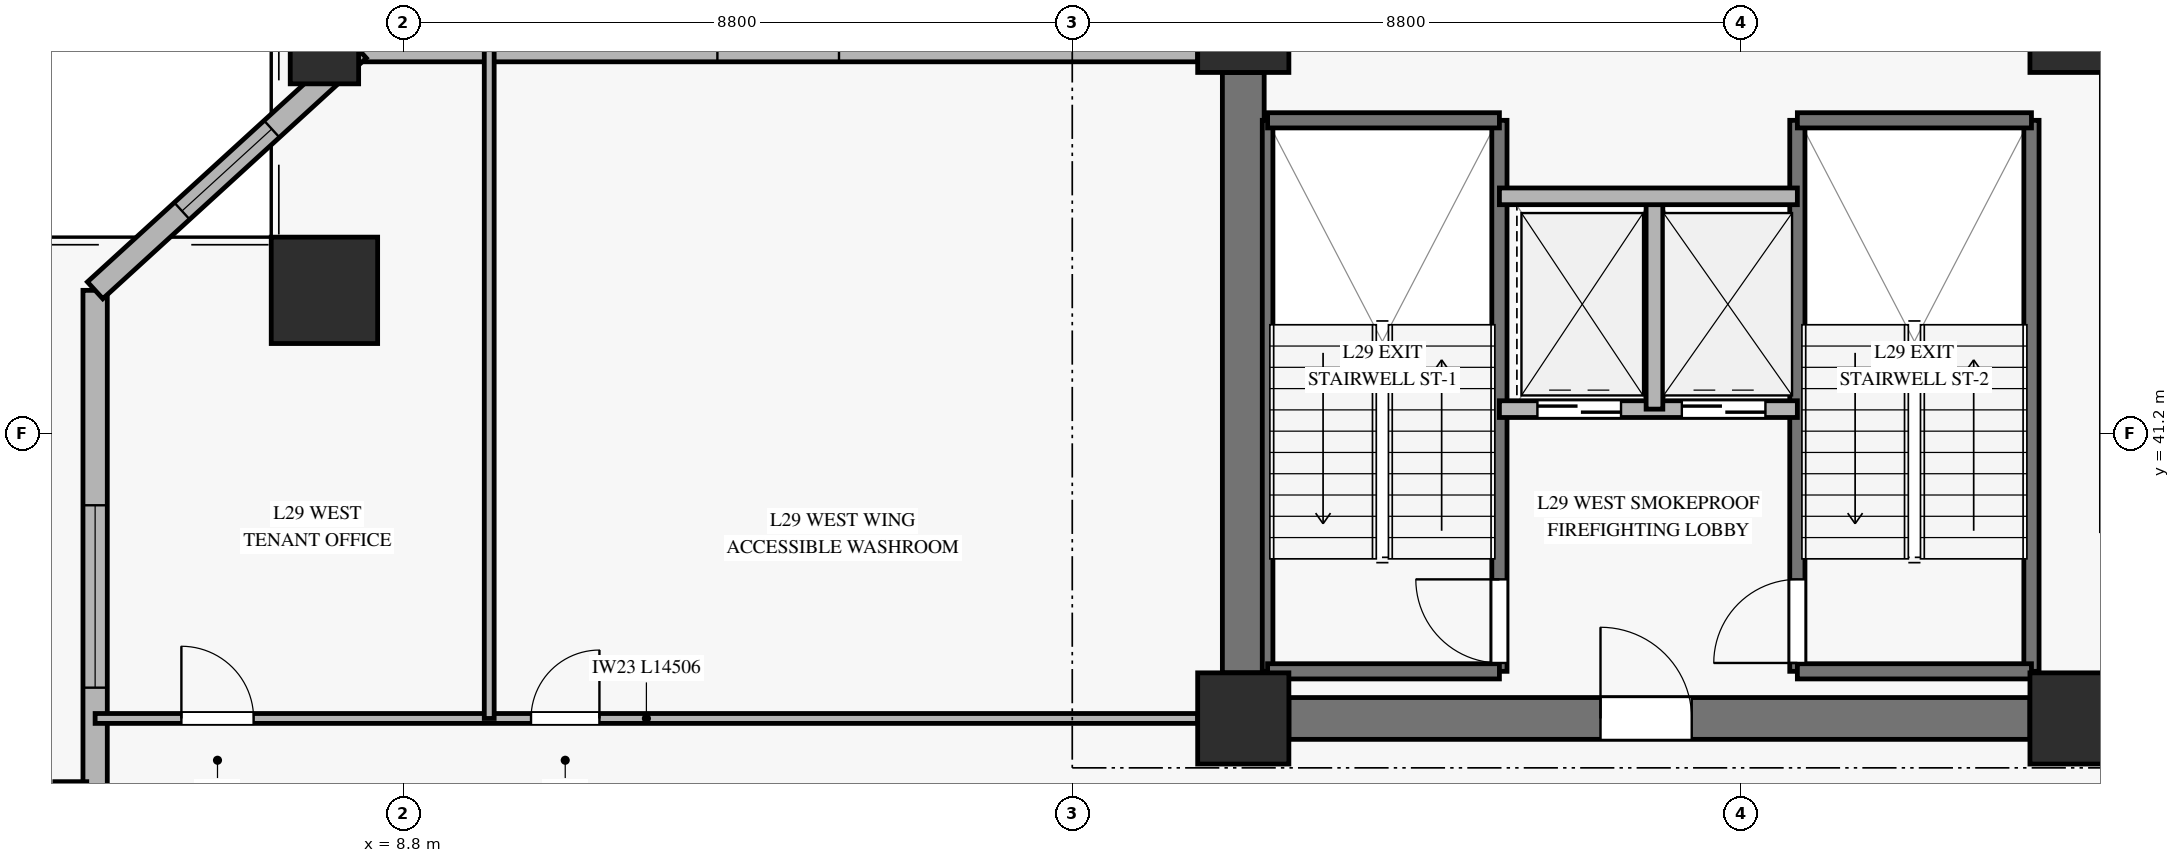
"""IFC4 building model, lengths in metres.
Left out: names, types, materials, properties, quantities, classifications, styles, units other than length and angle.
Written with IfcOpenShell. Run it as: python <this file> out.ifc"""

import sys

from ifc_helpers import new_model, si_unit, direction, frame, frame_2d, origin, origin_2d, place, context, subcontext, project, spatial, rectangle, hollow_rectangle, extrude, source, transform, mapped, element, fill, save


model = new_model("IFC4")
c1 = context("Model", 3, precision=1e-05, world=origin(), true_north=direction((0.0, 1.0)))
c2 = subcontext(c1, "Body", "Model", "MODEL_VIEW")
j1 = project(units=[si_unit("LENGTHUNIT", "METRE"), si_unit("PLANEANGLEUNIT", "RADIAN")], contexts=[c1])
p1 = place(None, origin())
s1 = spatial("IfcSite", under=j1, at=p1, CompositionType="ELEMENT")
p2 = place(p1, origin())
s2 = spatial("IfcBuilding", under=s1, at=p2, CompositionType="ELEMENT")
p3 = place(p2, frame((0.0, 0.0, 119.2)))
s3 = spatial("IfcBuildingStorey", under=s2, at=p3, CompositionType="ELEMENT", Elevation=119.2)
m1 = source(origin(), c2, "Body", "SweptSolid", [
    extrude(rectangle(XDim=1.2, YDim=1.2, at=origin_2d()), origin(), (0.0, 0.0, 1.0), 3.68),
])
for number, where, z_axis, x_axis in (
    (1, (19.85, 37.45, 0.0), (0.0, 0.0, 1.0), (1.0, 0.0, 0.0)),
    (2, (19.85, 46.55, 0.0), (0.0, 0.0, 1.0), (1.0, 0.0, 0.0)),
    (3, (30.8, 37.45, 0.0), (0.0, 0.0, 1.0), (1.0, 0.0, 0.0)),
    (4, (30.8, 46.55, 0.0), (0.0, 0.0, 1.0), (1.0, 0.0, 0.0)),
):
    element("IfcColumn", number, at=place(p3, frame(where, z_axis=z_axis, x_axis=x_axis)), inside=s3, PredefinedType="PILASTER", context=c2, shape_type="MappedRepresentation", body=[
        mapped(m1, transform((0.0, 0.0, 0.0), x_axis=(1.0, 0.0, 0.0), y_axis=(0.0, 1.0, 0.0), z_axis=(0.0, 0.0, 1.0), scale=1.0)),
    ])
p4 = place(p3, frame((20.45, 37.45, 0.0), z_axis=(0.0, 0.0, 1.0), x_axis=(1.0, 0.0, 0.0)))
e5 = element("IfcWall", 5, at=p4, inside=s3, PredefinedType="SHEAR", context=c2, shape_type="SweptSolid", body=[
    extrude(rectangle(XDim=9.75, YDim=0.55, at=frame_2d((4.875, 0.0))), origin(), (0.0, 0.0, 1.0), 3.68),
])
p5 = place(p4, frame((4.1, 0.0, 0.0)))
e6 = element("IfcOpeningElement", 6, at=p5, cuts=e5, PredefinedType="OPENING", context=c2, shape_type="SweptSolid", body=[
    extrude(rectangle(XDim=1.2, YDim=2.15, at=frame_2d((0.6, 1.075))), frame((0.0, 0.285, 0.0), z_axis=(0.0, -1.0, 0.0), x_axis=(1.0, 0.0, 0.0)), (0.0, 0.0, 1.0), 0.57),
])
p6 = place(p3, frame((19.85, 38.05, 0.0), z_axis=(0.0, 0.0, 1.0), x_axis=(0.0, 1.0, 0.0)))
e7 = element("IfcWall", 7, at=p6, inside=s3, PredefinedType="SHEAR", context=c2, shape_type="SweptSolid", body=[
    extrude(rectangle(XDim=7.9, YDim=0.55, at=frame_2d((3.95, 0.0))), origin(), (0.0, 0.0, 1.0), 3.68),
])
m2 = source(origin(), c2, "Body", "SweptSolid", [
    extrude(hollow_rectangle(XDim=1.4, YDim=1.4, WallThickness=0.065, at=origin_2d()), origin(), (0.0, 0.0, 1.0), 3.686),
])
p7 = place(p3, frame((7.761, 43.083, 0.0), z_axis=(0.056697532498, 0.007020956127, 0.998366714181), x_axis=(-0.122893119903, 0.992419911671, 0.0)))
e8 = element("IfcColumn", 8, at=p7, inside=s3, PredefinedType="COLUMN", context=c2, shape_type="MappedRepresentation", body=[
    mapped(m2, transform((0.0, 0.0, 0.0), x_axis=(1.0, 0.0, 0.0), y_axis=(0.0, 1.0, 0.0), z_axis=(0.0, 0.0, 1.0), scale=1.0)),
])
m3 = source(origin(), c2, "Body", "SweptSolid", [
    extrude(hollow_rectangle(XDim=0.9, YDim=0.9, WallThickness=0.04, at=origin_2d()), origin(), (0.0, 0.0, 1.0), 3.686),
])
p8 = place(p3, frame((7.761, 46.25, 0.0), z_axis=(0.056698929969, 0.0, 0.998391321747), x_axis=(0.0, 1.0, 0.0)))
e9 = element("IfcColumn", 9, at=p8, inside=s3, PredefinedType="COLUMN", context=c2, shape_type="MappedRepresentation", body=[
    mapped(m3, transform((0.0, 0.0, 0.0), x_axis=(1.0, 0.0, 0.0), y_axis=(0.0, 1.0, 0.0), z_axis=(0.0, 0.0, 1.0), scale=1.0)),
])
p9 = place(p3, frame((4.744, 26.995, 0.0), z_axis=(0.0, 0.0, 1.0), x_axis=(0.0, 1.0, 0.0)))
e10 = element("IfcWall", 10, at=p9, inside=s3, PredefinedType="SOLIDWALL", context=c2, shape_type="SweptSolid", body=[
    extrude(rectangle(XDim=16.088, YDim=0.32, at=frame_2d((8.044, 0.0))), origin(), (0.0, 0.0, 1.0), 3.16),
])
p10 = place(p9, frame((10.86, 0.0, 0.45)))
e11 = element("IfcOpeningElement", 11, at=p10, cuts=e10, PredefinedType="OPENING", context=c2, shape_type="SweptSolid", body=[
    extrude(rectangle(XDim=2.4, YDim=2.1, at=frame_2d((1.2, 1.05))), frame((0.0, 0.17, 0.0), z_axis=(0.0, -1.0, 0.0), x_axis=(1.0, 0.0, 0.0)), (0.0, 0.0, 1.0), 0.34),
])
p11 = place(p3, frame((8.211, 46.25, 0.0), z_axis=(0.0, 0.0, 1.0), x_axis=(1.0, 0.0, 0.0)))
e12 = element("IfcWall", 12, at=p11, inside=s3, PredefinedType="SOLIDWALL", context=c2, shape_type="SweptSolid", body=[
    extrude(rectangle(XDim=11.039, YDim=0.32, at=frame_2d((5.52, 0.0))), origin(), (0.0, 0.0, 1.0), 3.16),
])
p12 = place(p11, frame((4.72, 0.0, 0.45)))
e13 = element("IfcOpeningElement", 13, at=p12, cuts=e12, PredefinedType="OPENING", context=c2, shape_type="SweptSolid", body=[
    extrude(rectangle(XDim=1.6, YDim=2.0, at=frame_2d((0.8, 1.0))), frame((0.0, 0.17, 0.0), z_axis=(0.0, -1.0, 0.0), x_axis=(1.0, 0.0, 0.0)), (0.0, 0.0, 1.0), 0.34),
])
p13 = place(p3, frame((8.211, 46.25, 0.0), z_axis=(0.0, 0.0, 1.0), x_axis=(-0.738333520178, -0.674435773801, 0.0)))
e14 = element("IfcWall", 14, at=p13, inside=s3, PredefinedType="SOLIDWALL", context=c2, shape_type="SweptSolid", body=[
    extrude(rectangle(XDim=4.696, YDim=0.3, at=frame_2d((2.348, 0.0))), origin(), (0.0, 0.0, 1.0), 3.16),
])
p14 = place(p13, frame((1.548, 0.0, 0.45)))
e15 = element("IfcOpeningElement", 15, at=p14, cuts=e14, PredefinedType="OPENING", context=c2, shape_type="SweptSolid", body=[
    extrude(rectangle(XDim=1.6, YDim=2.0, at=frame_2d((0.8, 1.0))), frame((0.0, 0.16, 0.0), z_axis=(0.0, -1.0, 0.0), x_axis=(1.0, 0.0, 0.0)), (0.0, 0.0, 1.0), 0.32),
])
p15 = place(p3, frame((20.17, 38.07, 0.0), z_axis=(0.0, 0.0, 1.0), x_axis=(0.0, 1.0, 0.0)))
e16 = element("IfcWall", 16, at=p15, inside=s3, PredefinedType="SOLIDWALL", context=c2, shape_type="SweptSolid", body=[
    extrude(rectangle(XDim=7.25, YDim=0.14, at=frame_2d((3.625, 0.0))), origin(), (0.0, 0.0, 1.0), 3.9),
])
p16 = place(p3, frame((23.22, 38.07, 0.0), z_axis=(0.0, 0.0, 1.0), x_axis=(0.0, 1.0, 0.0)))
e17 = element("IfcWall", 17, at=p16, inside=s3, PredefinedType="SOLIDWALL", context=c2, shape_type="SweptSolid", body=[
    extrude(rectangle(XDim=7.25, YDim=0.2, at=frame_2d((3.625, 0.0))), origin(), (0.0, 0.0, 1.0), 3.9),
])
p17 = place(p16, frame((0.11, 0.0, 0.0)))
e18 = element("IfcOpeningElement", 18, at=p17, cuts=e17, PredefinedType="OPENING", context=c2, shape_type="SweptSolid", body=[
    extrude(rectangle(XDim=1.1, YDim=2.15, at=frame_2d((0.55, 1.075))), frame((0.0, 0.11, 0.0), z_axis=(0.0, -1.0, 0.0), x_axis=(1.0, 0.0, 0.0)), (0.0, 0.0, 1.0), 0.22),
])
for number, where, z_axis, x_axis in (
    (19, (20.17, 45.32, 0.0), (0.0, 0.0, 1.0), (1.0, 0.0, 0.0)),
    (20, (20.17, 38.07, 0.0), (0.0, 0.0, 1.0), (1.0, 0.0, 0.0)),
):
    element("IfcWall", number, at=place(p3, frame(where, z_axis=z_axis, x_axis=x_axis)), inside=s3, PredefinedType="SOLIDWALL", context=c2, shape_type="SweptSolid", body=[
        extrude(rectangle(XDim=3.05, YDim=0.2, at=frame_2d((1.525, 0.0))), origin(), (0.0, 0.0, 1.0), 3.9),
    ])
p18 = place(p3, frame((27.14, 38.07, 0.0), z_axis=(0.0, 0.0, 1.0), x_axis=(0.0, 1.0, 0.0)))
e21 = element("IfcWall", 21, at=p18, inside=s3, PredefinedType="SOLIDWALL", context=c2, shape_type="SweptSolid", body=[
    extrude(rectangle(XDim=7.25, YDim=0.2, at=frame_2d((3.625, 0.0))), origin(), (0.0, 0.0, 1.0), 3.9),
])
p19 = place(p18, frame((0.11, 0.0, 0.0)))
e22 = element("IfcOpeningElement", 22, at=p19, cuts=e21, PredefinedType="OPENING", context=c2, shape_type="SweptSolid", body=[
    extrude(rectangle(XDim=1.1, YDim=2.15, at=frame_2d((0.55, 1.075))), frame((0.0, 0.11, 0.0), z_axis=(0.0, -1.0, 0.0), x_axis=(1.0, 0.0, 0.0)), (0.0, 0.0, 1.0), 0.22),
])
p20 = place(p3, frame((30.22, 38.07, 0.0), z_axis=(0.0, 0.0, 1.0), x_axis=(0.0, 1.0, 0.0)))
e23 = element("IfcWall", 23, at=p20, inside=s3, PredefinedType="SOLIDWALL", context=c2, shape_type="SweptSolid", body=[
    extrude(rectangle(XDim=7.25, YDim=0.2, at=frame_2d((3.625, 0.0))), origin(), (0.0, 0.0, 1.0), 3.9),
])
for number, where, z_axis, x_axis in (
    (24, (27.14, 45.32, 0.0), (0.0, 0.0, 1.0), (1.0, 0.0, 0.0)),
    (25, (27.14, 38.07, 0.0), (0.0, 0.0, 1.0), (1.0, 0.0, 0.0)),
):
    element("IfcWall", number, at=place(p3, frame(where, z_axis=z_axis, x_axis=x_axis)), inside=s3, PredefinedType="SOLIDWALL", context=c2, shape_type="SweptSolid", body=[
        extrude(rectangle(XDim=3.08, YDim=0.2, at=frame_2d((1.54, 0.0))), origin(), (0.0, 0.0, 1.0), 3.9),
    ])
p21 = place(p3, frame((23.22, 41.52, 0.0), z_axis=(0.0, 0.0, 1.0), x_axis=(1.0, 0.0, 0.0)))
e26 = element("IfcWall", 26, at=p21, inside=s3, PredefinedType="SOLIDWALL", context=c2, shape_type="SweptSolid", body=[
    extrude(rectangle(XDim=3.92, YDim=0.22, at=frame_2d((1.96, 0.0))), origin(), (0.0, 0.0, 1.0), 3.68),
])
p22 = place(p21, frame((0.5, 0.0, 0.0)))
e27 = element("IfcOpeningElement", 27, at=p22, cuts=e26, PredefinedType="OPENING", context=c2, shape_type="SweptSolid", body=[
    extrude(rectangle(XDim=1.1, YDim=2.2, at=frame_2d((0.55, 1.1))), frame((0.0, 0.12, 0.0), z_axis=(0.0, -1.0, 0.0), x_axis=(1.0, 0.0, 0.0)), (0.0, 0.0, 1.0), 0.24),
])
p23 = place(p21, frame((2.4, 0.0, 0.0)))
e28 = element("IfcOpeningElement", 28, at=p23, cuts=e26, PredefinedType="OPENING", context=c2, shape_type="SweptSolid", body=[
    extrude(rectangle(XDim=1.1, YDim=2.2, at=frame_2d((0.55, 1.1))), frame((0.0, 0.12, 0.0), z_axis=(0.0, -1.0, 0.0), x_axis=(1.0, 0.0, 0.0)), (0.0, 0.0, 1.0), 0.24),
])
p24 = place(p3, frame((25.26, 41.52, 0.0), z_axis=(0.0, 0.0, 1.0), x_axis=(0.0, 1.0, 0.0)))
e29 = element("IfcWall", 29, at=p24, inside=s3, PredefinedType="SOLIDWALL", context=c2, shape_type="SweptSolid", body=[
    extrude(rectangle(XDim=2.8, YDim=0.22, at=frame_2d((1.4, 0.0))), origin(), (0.0, 0.0, 1.0), 3.68),
])
p25 = place(p3, frame((23.22, 44.32, 0.0), z_axis=(0.0, 0.0, 1.0), x_axis=(1.0, 0.0, 0.0)))
e30 = element("IfcWall", 30, at=p25, inside=s3, PredefinedType="SOLIDWALL", context=c2, shape_type="SweptSolid", body=[
    extrude(rectangle(XDim=3.92, YDim=0.22, at=frame_2d((1.96, 0.0))), origin(), (0.0, 0.0, 1.0), 3.68),
])
p26 = place(p3, frame((4.744, 37.45, 0.0), z_axis=(0.0, 0.0, 1.0), x_axis=(1.0, 0.0, 0.0)))
e31 = element("IfcWall", 31, at=p26, inside=s3, PredefinedType="PARTITIONING", context=c2, shape_type="SweptSolid", body=[
    extrude(rectangle(XDim=14.506, YDim=0.13, at=frame_2d((7.253, 0.0))), origin(), (0.0, 0.0, 1.0), 3.165),
])
p27 = place(p26, frame((1.135, 0.0, 0.0)))
e32 = element("IfcOpeningElement", 32, at=p27, cuts=e31, PredefinedType="OPENING", context=c2, shape_type="SweptSolid", body=[
    extrude(rectangle(XDim=0.95, YDim=2.1, at=frame_2d((0.475, 1.05))), frame((0.0, 0.075, 0.0), z_axis=(0.0, -1.0, 0.0), x_axis=(1.0, 0.0, 0.0)), (0.0, 0.0, 1.0), 0.15),
])
p28 = place(p26, frame((5.735, 0.0, 0.0)))
e33 = element("IfcOpeningElement", 33, at=p28, cuts=e31, PredefinedType="OPENING", context=c2, shape_type="SweptSolid", body=[
    extrude(rectangle(XDim=0.9, YDim=2.1, at=frame_2d((0.45, 1.05))), frame((0.0, 0.075, 0.0), z_axis=(0.0, -1.0, 0.0), x_axis=(1.0, 0.0, 0.0)), (0.0, 0.0, 1.0), 0.15),
])
p29 = place(p3, frame((9.929, 37.45, 0.0), z_axis=(0.0, 0.0, 1.0), x_axis=(0.0, 1.0, 0.0)))
e34 = element("IfcWall", 34, at=p29, inside=s3, PredefinedType="PARTITIONING", context=c2, shape_type="SweptSolid", body=[
    extrude(rectangle(XDim=8.8, YDim=0.13, at=frame_2d((4.4, 0.0))), origin(), (0.0, 0.0, 1.0), 3.68),
])
m4 = source(origin(), c2, "Body", "SweptSolid", [
    extrude(rectangle(XDim=2.4, YDim=2.1, at=frame_2d((1.2, 1.05))), frame((0.0, 0.03, 0.0), z_axis=(0.0, -1.0, 0.0), x_axis=(1.0, 0.0, 0.0)), (0.0, 0.0, 1.0), 0.06),
])
p30 = place(p10, origin())
e35 = element("IfcWindow", 35, at=p30, inside=s3, PartitioningType="SINGLE_PANEL", PredefinedType="WINDOW", context=c2, shape_type="MappedRepresentation", body=[
    mapped(m4, transform((0.0, 0.0, 0.0), x_axis=(1.0, 0.0, 0.0), y_axis=(0.0, 1.0, 0.0), z_axis=(0.0, 0.0, 1.0), scale=1.0)),
])
fill(e11, e35)
m5 = source(origin(), c2, "Body", "SweptSolid", [
    extrude(rectangle(XDim=1.6, YDim=2.0, at=frame_2d((0.8, 1.0))), frame((0.0, 0.03, 0.0), z_axis=(0.0, -1.0, 0.0), x_axis=(1.0, 0.0, 0.0)), (0.0, 0.0, 1.0), 0.06),
])
p31 = place(p14, origin())
e36 = element("IfcWindow", 36, at=p31, inside=s3, PartitioningType="SINGLE_PANEL", PredefinedType="WINDOW", context=c2, shape_type="MappedRepresentation", body=[
    mapped(m5, transform((0.0, 0.0, 0.0), x_axis=(1.0, 0.0, 0.0), y_axis=(0.0, 1.0, 0.0), z_axis=(0.0, 0.0, 1.0), scale=1.0)),
])
fill(e15, e36)
m6 = source(origin(), c2, "Body", "SweptSolid", [
    extrude(rectangle(XDim=1.1, YDim=2.15, at=frame_2d((0.55, 1.075))), frame((0.0, 0.025, 0.0), z_axis=(0.0, -1.0, 0.0), x_axis=(1.0, 0.0, 0.0)), (0.0, 0.0, 1.0), 0.05),
])
p32 = place(p17, origin())
e37 = element("IfcDoor", 37, at=p32, inside=s3, OperationType="SINGLE_SWING_RIGHT", PredefinedType="DOOR", context=c2, shape_type="MappedRepresentation", body=[
    mapped(m6, transform((0.0, 0.0, 0.0), x_axis=(1.0, 0.0, 0.0), y_axis=(0.0, 1.0, 0.0), z_axis=(0.0, 0.0, 1.0), scale=1.0)),
])
fill(e18, e37)
p33 = place(p19, origin())
e38 = element("IfcDoor", 38, at=p33, inside=s3, OperationType="SINGLE_SWING_LEFT", PredefinedType="DOOR", context=c2, shape_type="MappedRepresentation", body=[
    mapped(m6, transform((0.0, 0.0, 0.0), x_axis=(1.0, 0.0, 0.0), y_axis=(0.0, 1.0, 0.0), z_axis=(0.0, 0.0, 1.0), scale=1.0)),
])
fill(e22, e38)
m7 = source(origin(), c2, "Body", "SweptSolid", [
    extrude(rectangle(XDim=1.1, YDim=2.2, at=frame_2d((0.55, 1.1))), frame((0.0, 0.025, 0.0), z_axis=(0.0, -1.0, 0.0), x_axis=(1.0, 0.0, 0.0)), (0.0, 0.0, 1.0), 0.05),
])
p34 = place(p22, origin())
e39 = element("IfcDoor", 39, at=p34, inside=s3, OperationType="SLIDING_TO_LEFT", PredefinedType="DOOR", context=c2, shape_type="MappedRepresentation", body=[
    mapped(m7, transform((0.0, 0.0, 0.0), x_axis=(1.0, 0.0, 0.0), y_axis=(0.0, 1.0, 0.0), z_axis=(0.0, 0.0, 1.0), scale=1.0)),
])
fill(e27, e39)
p35 = place(p23, origin())
e40 = element("IfcDoor", 40, at=p35, inside=s3, OperationType="SLIDING_TO_LEFT", PredefinedType="DOOR", context=c2, shape_type="MappedRepresentation", body=[
    mapped(m7, transform((0.0, 0.0, 0.0), x_axis=(1.0, 0.0, 0.0), y_axis=(0.0, 1.0, 0.0), z_axis=(0.0, 0.0, 1.0), scale=1.0)),
])
fill(e28, e40)
m8 = source(origin(), c2, "Body", "SweptSolid", [
    extrude(rectangle(XDim=1.2, YDim=2.15, at=frame_2d((0.6, 1.075))), frame((0.0, 0.025, 0.0), z_axis=(0.0, -1.0, 0.0), x_axis=(1.0, 0.0, 0.0)), (0.0, 0.0, 1.0), 0.05),
])
p36 = place(p5, origin())
e41 = element("IfcDoor", 41, at=p36, inside=s3, OperationType="SINGLE_SWING_LEFT", PredefinedType="DOOR", context=c2, shape_type="MappedRepresentation", body=[
    mapped(m8, transform((0.0, 0.0, 0.0), x_axis=(1.0, 0.0, 0.0), y_axis=(0.0, 1.0, 0.0), z_axis=(0.0, 0.0, 1.0), scale=1.0)),
])
fill(e6, e41)
m9 = source(origin(), c2, "Body", "SweptSolid", [
    extrude(rectangle(XDim=0.95, YDim=2.1, at=frame_2d((0.475, 1.05))), frame((0.0, 0.025, 0.0), z_axis=(0.0, -1.0, 0.0), x_axis=(1.0, 0.0, 0.0)), (0.0, 0.0, 1.0), 0.05),
])
p37 = place(p27, origin())
e42 = element("IfcDoor", 42, at=p37, inside=s3, OperationType="SINGLE_SWING_LEFT", PredefinedType="DOOR", context=c2, shape_type="MappedRepresentation", body=[
    mapped(m9, transform((0.0, 0.0, 0.0), x_axis=(1.0, 0.0, 0.0), y_axis=(0.0, 1.0, 0.0), z_axis=(0.0, 0.0, 1.0), scale=1.0)),
])
fill(e32, e42)
m10 = source(origin(), c2, "Body", "SweptSolid", [
    extrude(rectangle(XDim=0.9, YDim=2.1, at=frame_2d((0.45, 1.05))), frame((0.0, 0.025, 0.0), z_axis=(0.0, -1.0, 0.0), x_axis=(1.0, 0.0, 0.0)), (0.0, 0.0, 1.0), 0.05),
])
p38 = place(p28, origin())
e43 = element("IfcDoor", 43, at=p38, inside=s3, OperationType="SINGLE_SWING_RIGHT", PredefinedType="DOOR", context=c2, shape_type="MappedRepresentation", body=[
    mapped(m10, transform((0.0, 0.0, 0.0), x_axis=(1.0, 0.0, 0.0), y_axis=(0.0, 1.0, 0.0), z_axis=(0.0, 0.0, 1.0), scale=1.0)),
])
fill(e33, e43)
save(model, sys.argv[1])
